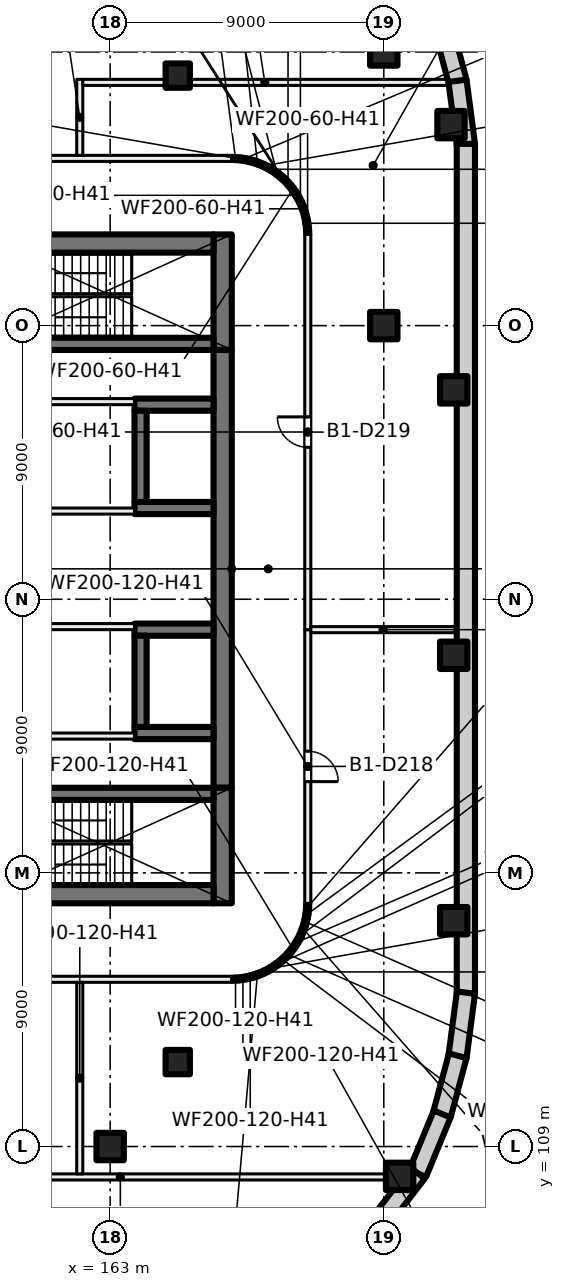
"""IFC4 building model, lengths in metres.
Left out: names, types, materials, properties, quantities, classifications, styles, units other than length and angle.
Written with IfcOpenShell. Run it as: python <this file> out.ifc"""

import sys

from ifc_helpers import new_model, si_unit, direction, frame, frame_2d, origin, origin_2d, place, context, subcontext, project, spatial, rectangle, extrude, element, fill, save


model = new_model("IFC4")
c1 = context("Model", 3, precision=1e-05, world=origin(), true_north=direction((0.0, 1.0)))
c2 = subcontext(c1, "Body", "Model", "MODEL_VIEW")
j1 = project(units=[si_unit("LENGTHUNIT", "METRE"), si_unit("PLANEANGLEUNIT", "RADIAN")], contexts=[c1])
p1 = place(None, origin())
s1 = spatial("IfcSite", under=j1, at=p1, CompositionType="ELEMENT")
p2 = place(p1, origin())
s2 = spatial("IfcBuilding", under=s1, at=p2, CompositionType="ELEMENT")
p3 = place(p2, frame((0.0, 0.0, -4.5)))
s3 = spatial("IfcBuildingStorey", under=s2, at=p3, CompositionType="ELEMENT", Elevation=-4.5)
p4 = place(p3, frame((173.908, 145.968, 0.0), z_axis=(0.0, 0.0, 1.0), x_axis=(0.258804467146, -0.965929732323, 0.0)))
e1 = element("IfcWall", 1, at=p4, inside=s3, PredefinedType="SHEAR", context=c2, shape_type="SweptSolid", body=[
    extrude(rectangle(XDim=2.022, YDim=0.6, at=frame_2d((1.011, 0.0))), origin(), (0.0, 0.0, 1.0), 4.5),
])
p5 = place(p3, frame((174.424, 144.052, 0.0), z_axis=(0.0, 0.0, 1.0), x_axis=(0.130558200013, -0.991440646942, 0.0)))
e2 = element("IfcWall", 2, at=p5, inside=s3, PredefinedType="SHEAR", context=c2, shape_type="SweptSolid", body=[
    extrude(rectangle(XDim=2.132, YDim=0.6, at=frame_2d((1.066, 0.0))), origin(), (0.0, 0.0, 1.0), 4.5),
])
p6 = place(p3, frame((174.7, 141.978, 0.0), z_axis=(0.0, 0.0, 1.0), x_axis=(0.0, -1.0, 0.0)))
e3 = element("IfcWall", 3, at=p6, inside=s3, PredefinedType="SHEAR", context=c2, shape_type="SweptSolid", body=[
    extrude(rectangle(XDim=27.957, YDim=0.6, at=frame_2d((13.978, 0.0))), origin(), (0.0, 0.0, 1.0), 4.5),
])
p7 = place(p3, frame((174.703, 114.061, 0.0), z_axis=(0.0, 0.0, 1.0), x_axis=(-0.130558200013, -0.991440646942, 0.0)))
e4 = element("IfcWall", 4, at=p7, inside=s3, PredefinedType="SHEAR", context=c2, shape_type="SweptSolid", body=[
    extrude(rectangle(XDim=2.132, YDim=0.6, at=frame_2d((1.066, 0.0))), origin(), (0.0, 0.0, 1.0), 4.5),
])
p8 = place(p3, frame((174.432, 111.986, 0.0), z_axis=(0.0, 0.0, 1.0), x_axis=(-0.258804467146, -0.965929732323, 0.0)))
e5 = element("IfcWall", 5, at=p8, inside=s3, PredefinedType="SHEAR", context=c2, shape_type="SweptSolid", body=[
    extrude(rectangle(XDim=2.022, YDim=0.6, at=frame_2d((1.011, 0.0))), origin(), (0.0, 0.0, 1.0), 4.5),
])
p9 = place(p3, frame((173.921, 110.069, 0.0), z_axis=(0.0, 0.0, 1.0), x_axis=(-0.382375593358, -0.924006983526, 0.0)))
e6 = element("IfcWall", 6, at=p9, inside=s3, PredefinedType="SHEAR", context=c2, shape_type="SweptSolid", body=[
    extrude(rectangle(XDim=2.114, YDim=0.6, at=frame_2d((1.057, 0.0))), origin(), (0.0, 0.0, 1.0), 4.5),
])
p10 = place(p3, frame((173.109, 108.128, 0.0), z_axis=(0.0, 0.0, 1.0), x_axis=(-0.609058260448, -0.793125485267, 0.0)))
e7 = element("IfcWall", 7, at=p10, inside=s3, PredefinedType="SHEAR", context=c2, shape_type="SweptSolid", body=[
    extrude(rectangle(XDim=2.044, YDim=0.6, at=frame_2d((1.022, 0.0))), origin(), (0.0, 0.0, 1.0), 4.5),
])
for number, where, z_axis, x_axis in (
    (8, (163.0, 109.0, 0.0), (0.0, 0.0, 1.0), (1.0, 0.0, 0.0)),
    (9, (172.0, 136.0, 0.0), (0.0, 0.0, 1.0), (1.0, 0.0, 0.0)),
    (10, (172.0, 145.0, 0.0), (0.0, 0.0, 1.0), (1.0, 0.0, 0.0)),
    (11, (174.211, 142.611, 0.0), (0.0, 0.0, 1.0), (1.0, 0.0, 0.0)),
    (12, (174.3, 133.887, 0.0), (0.0, 0.0, 1.0), (1.0, 0.0, 0.0)),
    (13, (174.3, 125.157, 0.0), (0.0, 0.0, 1.0), (1.0, 0.0, 0.0)),
    (14, (174.3, 116.427, 0.0), (0.0, 0.0, 1.0), (1.0, 0.0, 0.0)),
    (15, (172.521, 108.019, 0.0), (0.0, 0.0, 1.0), (1.0, 0.0, 0.0)),
):
    element("IfcColumn", number, at=place(p3, frame(where, z_axis=z_axis, x_axis=x_axis)), inside=s3, PredefinedType="COLUMN", context=c2, shape_type="SweptSolid", body=[
        extrude(rectangle(XDim=0.9, YDim=0.9, at=origin_2d()), origin(), (0.0, 0.0, 1.0), 4.5),
    ])
for number, where, z_axis, x_axis in (
    (16, (165.223, 144.223, 0.0), (0.0, 0.0, 1.0), (1.0, 0.0, 0.0)),
    (17, (165.223, 111.777, 0.0), (0.0, 0.0, 1.0), (1.0, 0.0, 0.0)),
):
    element("IfcColumn", number, at=place(p3, frame(where, z_axis=z_axis, x_axis=x_axis)), inside=s3, PredefinedType="COLUMN", context=c2, shape_type="SweptSolid", body=[
        extrude(rectangle(XDim=0.8, YDim=0.8, at=origin_2d()), origin(), (0.0, 0.0, 1.0), 4.5),
    ])
p11 = place(p3, frame((166.7, 139.0, 0.0), z_axis=(0.0, 0.0, 1.0), x_axis=(0.0, -1.0, 0.0)))
e18 = element("IfcWall", 18, at=p11, inside=s3, PredefinedType="SHEAR", context=c2, shape_type="SweptSolid", body=[
    extrude(rectangle(XDim=3.8, YDim=0.6, at=frame_2d((1.9, 0.0))), origin(), (0.0, 0.0, 1.0), 4.5),
])
p12 = place(p3, frame((166.7, 135.2, 0.0), z_axis=(0.0, 0.0, 1.0), x_axis=(0.0, -1.0, 0.0)))
e19 = element("IfcWall", 19, at=p12, inside=s3, PredefinedType="SHEAR", context=c2, shape_type="SweptSolid", body=[
    extrude(rectangle(XDim=14.4, YDim=0.6, at=frame_2d((7.2, 0.0))), origin(), (0.0, 0.0, 1.0), 4.5),
])
p13 = place(p3, frame((166.7, 120.8, 0.0), z_axis=(0.0, 0.0, 1.0), x_axis=(0.0, -1.0, 0.0)))
e20 = element("IfcWall", 20, at=p13, inside=s3, PredefinedType="SHEAR", context=c2, shape_type="SweptSolid", body=[
    extrude(rectangle(XDim=3.8, YDim=0.6, at=frame_2d((1.9, 0.0))), origin(), (0.0, 0.0, 1.0), 4.5),
])
for number, where, z_axis, x_axis in (
    (21, (166.4, 138.7, 0.0), (0.0, 0.0, 1.0), (-1.0, 0.0, 0.0)),
    (22, (166.4, 117.3, 0.0), (0.0, 0.0, 1.0), (-1.0, 0.0, 0.0)),
):
    element("IfcWall", number, at=place(p3, frame(where, z_axis=z_axis, x_axis=x_axis)), inside=s3, PredefinedType="SHEAR", context=c2, shape_type="SweptSolid", body=[
        extrude(rectangle(XDim=7.8, YDim=0.6, at=frame_2d((3.9, 0.0))), origin(), (0.0, 0.0, 1.0), 4.5),
    ])
for number, where, z_axis, x_axis in (
    (23, (166.4, 135.4, 0.0), (0.0, 0.0, 1.0), (-1.0, 0.0, 0.0)),
    (24, (166.4, 120.6, 0.0), (0.0, 0.0, 1.0), (-1.0, 0.0, 0.0)),
):
    element("IfcWall", number, at=place(p3, frame(where, z_axis=z_axis, x_axis=x_axis)), inside=s3, PredefinedType="SHEAR", context=c2, shape_type="SweptSolid", body=[
        extrude(rectangle(XDim=7.8, YDim=0.4, at=frame_2d((3.9, 0.0))), origin(), (0.0, 0.0, 1.0), 4.5),
    ])
for number, where, z_axis, x_axis in (
    (25, (166.4, 130.0, 0.0), (0.0, 0.0, 1.0), (-1.0, 0.0, 0.0)),
    (26, (166.4, 133.4, 0.0), (0.0, 0.0, 1.0), (-1.0, 0.0, 0.0)),
):
    element("IfcWall", number, at=place(p3, frame(where, z_axis=z_axis, x_axis=x_axis)), inside=s3, PredefinedType="SHEAR", context=c2, shape_type="SweptSolid", body=[
        extrude(rectangle(XDim=2.6, YDim=0.4, at=frame_2d((1.3, 0.0))), origin(), (0.0, 0.0, 1.0), 4.5),
    ])
p14 = place(p3, frame((164.0, 133.2, 0.0), z_axis=(0.0, 0.0, 1.0), x_axis=(0.0, -1.0, 0.0)))
e27 = element("IfcWall", 27, at=p14, inside=s3, PredefinedType="SHEAR", context=c2, shape_type="SweptSolid", body=[
    extrude(rectangle(XDim=3.0, YDim=0.4, at=frame_2d((1.5, 0.0))), origin(), (0.0, 0.0, 1.0), 4.5),
])
for number, where, z_axis, x_axis in (
    (28, (166.4, 126.0, 0.0), (0.0, 0.0, 1.0), (-1.0, 0.0, 0.0)),
    (29, (166.4, 122.6, 0.0), (0.0, 0.0, 1.0), (-1.0, 0.0, 0.0)),
):
    element("IfcWall", number, at=place(p3, frame(where, z_axis=z_axis, x_axis=x_axis)), inside=s3, PredefinedType="SHEAR", context=c2, shape_type="SweptSolid", body=[
        extrude(rectangle(XDim=2.6, YDim=0.4, at=frame_2d((1.3, 0.0))), origin(), (0.0, 0.0, 1.0), 4.5),
    ])
p15 = place(p3, frame((164.0, 125.8, 0.0), z_axis=(0.0, 0.0, 1.0), x_axis=(0.0, -1.0, 0.0)))
e30 = element("IfcWall", 30, at=p15, inside=s3, PredefinedType="SHEAR", context=c2, shape_type="SweptSolid", body=[
    extrude(rectangle(XDim=3.0, YDim=0.4, at=frame_2d((1.5, 0.0))), origin(), (0.0, 0.0, 1.0), 4.5),
])
p16 = place(p3, frame((163.8, 126.1, 0.0), z_axis=(0.0, 0.0, 1.0), x_axis=(-1.0, 0.0, 0.0)))
e31 = element("IfcWall", 31, at=p16, inside=s3, PredefinedType="PARTITIONING", context=c2, shape_type="SweptSolid", body=[
    extrude(rectangle(XDim=9.4, YDim=0.2, at=frame_2d((4.7, 0.0))), origin(), (0.0, 0.0, 1.0), 4.1),
])
p17 = place(p16, frame((4.1, 0.0, 0.0)))
e32 = element("IfcOpeningElement", 32, at=p17, cuts=e31, PredefinedType="OPENING", context=c2, shape_type="SweptSolid", body=[
    extrude(rectangle(XDim=1.2, YDim=2.1, at=frame_2d((0.6, 1.05))), frame((0.0, 0.11, 0.0), z_axis=(0.0, -1.0, 0.0), x_axis=(1.0, 0.0, 0.0)), (0.0, 0.0, 1.0), 0.22),
])
p18 = place(p3, frame((163.8, 122.5, 0.0), z_axis=(0.0, 0.0, 1.0), x_axis=(-1.0, 0.0, 0.0)))
e33 = element("IfcWall", 33, at=p18, inside=s3, PredefinedType="PARTITIONING", context=c2, shape_type="SweptSolid", body=[
    extrude(rectangle(XDim=9.4, YDim=0.2, at=frame_2d((4.7, 0.0))), origin(), (0.0, 0.0, 1.0), 4.1),
])
p19 = place(p18, frame((6.55, 0.0, 0.0)))
e34 = element("IfcOpeningElement", 34, at=p19, cuts=e33, PredefinedType="OPENING", context=c2, shape_type="SweptSolid", body=[
    extrude(rectangle(XDim=1.5, YDim=2.1, at=frame_2d((0.75, 1.05))), frame((0.0, 0.11, 0.0), z_axis=(0.0, -1.0, 0.0), x_axis=(1.0, 0.0, 0.0)), (0.0, 0.0, 1.0), 0.22),
])
p20 = place(p3, frame((154.4, 129.9, 0.0), z_axis=(0.0, 0.0, 1.0), x_axis=(1.0, 0.0, 0.0)))
e35 = element("IfcWall", 35, at=p20, inside=s3, PredefinedType="PARTITIONING", context=c2, shape_type="SweptSolid", body=[
    extrude(rectangle(XDim=9.4, YDim=0.2, at=frame_2d((4.7, 0.0))), origin(), (0.0, 0.0, 1.0), 4.1),
])
p21 = place(p20, frame((4.1, 0.0, 0.0)))
e36 = element("IfcOpeningElement", 36, at=p21, cuts=e35, PredefinedType="OPENING", context=c2, shape_type="SweptSolid", body=[
    extrude(rectangle(XDim=1.2, YDim=2.1, at=frame_2d((0.6, 1.05))), frame((0.0, 0.11, 0.0), z_axis=(0.0, -1.0, 0.0), x_axis=(1.0, 0.0, 0.0)), (0.0, 0.0, 1.0), 0.22),
])
p22 = place(p3, frame((154.4, 133.5, 0.0), z_axis=(0.0, 0.0, 1.0), x_axis=(1.0, 0.0, 0.0)))
e37 = element("IfcWall", 37, at=p22, inside=s3, PredefinedType="PARTITIONING", context=c2, shape_type="SweptSolid", body=[
    extrude(rectangle(XDim=9.4, YDim=0.2, at=frame_2d((4.7, 0.0))), origin(), (0.0, 0.0, 1.0), 4.1),
])
p23 = place(p22, frame((1.35, 0.0, 0.0)))
e38 = element("IfcOpeningElement", 38, at=p23, cuts=e37, PredefinedType="OPENING", context=c2, shape_type="SweptSolid", body=[
    extrude(rectangle(XDim=1.5, YDim=2.1, at=frame_2d((0.75, 1.05))), frame((0.0, 0.11, 0.0), z_axis=(0.0, -1.0, 0.0), x_axis=(1.0, 0.0, 0.0)), (0.0, 0.0, 1.0), 0.22),
])
p24 = place(p3, frame((154.1, 108.0, 0.0), z_axis=(0.0, 0.0, 1.0), x_axis=(1.0, 0.0, 0.0)))
e39 = element("IfcWall", 39, at=p24, inside=s3, PredefinedType="PARTITIONING", context=c2, shape_type="SweptSolid", body=[
    extrude(rectangle(XDim=18.469, YDim=0.2, at=frame_2d((9.234, 0.0))), origin(), (0.0, 0.0, 1.0), 4.1),
])
p25 = place(p3, frame((167.002, 114.5, 0.0), z_axis=(0.0, 0.0, 1.0), x_axis=(-1.0, 0.0, 0.0)))
e40 = element("IfcWall", 40, at=p25, inside=s3, PredefinedType="PARTITIONING", context=c2, shape_type="SweptSolid", body=[
    extrude(rectangle(XDim=12.902, YDim=0.2, at=frame_2d((6.451, 0.0))), origin(), (0.0, 0.0, 1.0), 4.1),
])
p26 = place(p25, frame((8.5, 0.0, 0.0)))
e41 = element("IfcOpeningElement", 41, at=p26, cuts=e40, PredefinedType="OPENING", context=c2, shape_type="SweptSolid", body=[
    extrude(rectangle(XDim=1.0, YDim=2.1, at=frame_2d((0.5, 1.05))), frame((0.0, 0.11, 0.0), z_axis=(0.0, -1.0, 0.0), x_axis=(1.0, 0.0, 0.0)), (0.0, 0.0, 1.0), 0.22),
])
p27 = place(p3, frame((154.1, 141.5, 0.0), z_axis=(0.0, 0.0, 1.0), x_axis=(1.0, 0.0, 0.0)))
e42 = element("IfcWall", 42, at=p27, inside=s3, PredefinedType="PARTITIONING", context=c2, shape_type="SweptSolid", body=[
    extrude(rectangle(XDim=12.902, YDim=0.2, at=frame_2d((6.451, 0.0))), origin(), (0.0, 0.0, 1.0), 4.1),
])
p28 = place(p3, frame((162.0, 108.1, 0.0), z_axis=(0.0, 0.0, 1.0), x_axis=(0.0, 1.0, 0.0)))
e43 = element("IfcWall", 43, at=p28, inside=s3, PredefinedType="PARTITIONING", context=c2, shape_type="SweptSolid", body=[
    extrude(rectangle(XDim=6.3, YDim=0.2, at=frame_2d((3.15, 0.0))), origin(), (0.0, 0.0, 1.0), 4.1),
])
p29 = place(p3, frame((162.0, 141.6, 0.0), z_axis=(0.0, 0.0, 1.0), x_axis=(0.0, 1.0, 0.0)))
e44 = element("IfcWall", 44, at=p29, inside=s3, PredefinedType="PARTITIONING", context=c2, shape_type="SweptSolid", body=[
    extrude(rectangle(XDim=2.5, YDim=0.2, at=frame_2d((1.25, 0.0))), origin(), (0.0, 0.0, 1.0), 4.1),
])
p30 = place(p3, frame((162.1, 144.0, 0.0), z_axis=(0.0, 0.0, 1.0), x_axis=(1.0, 0.0, 0.0)))
e45 = element("IfcWall", 45, at=p30, inside=s3, PredefinedType="PARTITIONING", context=c2, shape_type="SweptSolid", body=[
    extrude(rectangle(XDim=11.974, YDim=0.2, at=frame_2d((5.987, 0.0))), origin(), (0.0, 0.0, 1.0), 4.1),
])
for number, where, z_axis, x_axis in (
    (46, (166.998, 114.5, 0.0), (0.0, 0.0, 1.0), (0.999, 0.047, 0.0)),
    (47, (166.998, 141.5, 0.0), (0.0, 0.0, 1.0), (0.999, -0.047, 0.0)),
):
    element("IfcWall", number, at=place(p3, frame(where, z_axis=z_axis, x_axis=x_axis)), inside=s3, PredefinedType="PARTITIONING", context=c2, shape_type="SweptSolid", body=[
        extrude(rectangle(XDim=0.252, YDim=0.2, at=frame_2d((0.126, 0.0))), origin(), (0.0, 0.0, 1.0), 4.1),
    ])
for number, where, z_axis, x_axis in (
    (48, (167.24, 114.511, 0.0), (0.0, 0.0, 1.0), (0.989, 0.149, 0.0)),
    (49, (167.24, 141.489, 0.0), (0.0, 0.0, 1.0), (0.989, -0.149, 0.0)),
):
    element("IfcWall", number, at=place(p3, frame(where, z_axis=z_axis, x_axis=x_axis)), inside=s3, PredefinedType="PARTITIONING", context=c2, shape_type="SweptSolid", body=[
        extrude(rectangle(XDim=0.256, YDim=0.2, at=frame_2d((0.128, 0.0))), origin(), (0.0, 0.0, 1.0), 4.1),
    ])
for number, where, z_axis, x_axis in (
    (50, (167.483, 114.547, 0.0), (0.0, 0.0, 1.0), (0.97, 0.242, 0.0)),
    (51, (167.483, 141.453, 0.0), (0.0, 0.0, 1.0), (0.97, -0.242, 0.0)),
):
    element("IfcWall", number, at=place(p3, frame(where, z_axis=z_axis, x_axis=x_axis)), inside=s3, PredefinedType="PARTITIONING", context=c2, shape_type="SweptSolid", body=[
        extrude(rectangle(XDim=0.256, YDim=0.2, at=frame_2d((0.128, 0.0))), origin(), (0.0, 0.0, 1.0), 4.1),
    ])
for number, where, z_axis, x_axis in (
    (52, (167.722, 114.606, 0.0), (0.0, 0.0, 1.0), (0.941, 0.337, 0.0)),
    (53, (167.722, 141.394, 0.0), (0.0, 0.0, 1.0), (0.941, -0.337, 0.0)),
):
    element("IfcWall", number, at=place(p3, frame(where, z_axis=z_axis, x_axis=x_axis)), inside=s3, PredefinedType="PARTITIONING", context=c2, shape_type="SweptSolid", body=[
        extrude(rectangle(XDim=0.255, YDim=0.2, at=frame_2d((0.127, 0.0))), origin(), (0.0, 0.0, 1.0), 4.1),
    ])
for number, where, z_axis, x_axis in (
    (54, (167.952, 114.688, 0.0), (0.0, 0.0, 1.0), (0.903, 0.429, 0.0)),
    (55, (167.952, 141.312, 0.0), (0.0, 0.0, 1.0), (0.903, -0.429, 0.0)),
):
    element("IfcWall", number, at=place(p3, frame(where, z_axis=z_axis, x_axis=x_axis)), inside=s3, PredefinedType="PARTITIONING", context=c2, shape_type="SweptSolid", body=[
        extrude(rectangle(XDim=0.255, YDim=0.2, at=frame_2d((0.127, 0.0))), origin(), (0.0, 0.0, 1.0), 4.1),
    ])
for number, where, z_axis, x_axis in (
    (56, (168.174, 114.793, 0.0), (0.0, 0.0, 1.0), (0.858, 0.514, 0.0)),
    (57, (168.174, 141.207, 0.0), (0.0, 0.0, 1.0), (0.858, -0.514, 0.0)),
):
    element("IfcWall", number, at=place(p3, frame(where, z_axis=z_axis, x_axis=x_axis)), inside=s3, PredefinedType="PARTITIONING", context=c2, shape_type="SweptSolid", body=[
        extrude(rectangle(XDim=0.255, YDim=0.2, at=frame_2d((0.127, 0.0))), origin(), (0.0, 0.0, 1.0), 4.1),
    ])
for number, where, z_axis, x_axis in (
    (58, (168.385, 114.918, 0.0), (0.0, 0.0, 1.0), (0.803, 0.596, 0.0)),
    (59, (168.385, 141.082, 0.0), (0.0, 0.0, 1.0), (0.803, -0.596, 0.0)),
):
    element("IfcWall", number, at=place(p3, frame(where, z_axis=z_axis, x_axis=x_axis)), inside=s3, PredefinedType="PARTITIONING", context=c2, shape_type="SweptSolid", body=[
        extrude(rectangle(XDim=0.255, YDim=0.2, at=frame_2d((0.128, 0.0))), origin(), (0.0, 0.0, 1.0), 4.1),
    ])
for number, where, z_axis, x_axis in (
    (60, (168.582, 115.064, 0.0), (0.0, 0.0, 1.0), (0.743, 0.669, 0.0)),
    (61, (168.582, 140.936, 0.0), (0.0, 0.0, 1.0), (0.743, -0.669, 0.0)),
    (62, (168.765, 115.228, 0.0), (0.0, 0.0, 1.0), (0.669, 0.743, 0.0)),
    (63, (168.765, 140.772, 0.0), (0.0, 0.0, 1.0), (0.669, -0.743, 0.0)),
):
    element("IfcWall", number, at=place(p3, frame(where, z_axis=z_axis, x_axis=x_axis)), inside=s3, PredefinedType="PARTITIONING", context=c2, shape_type="SweptSolid", body=[
        extrude(rectangle(XDim=0.256, YDim=0.2, at=frame_2d((0.128, 0.0))), origin(), (0.0, 0.0, 1.0), 4.1),
    ])
for number, where, z_axis, x_axis in (
    (64, (168.93, 115.41, 0.0), (0.0, 0.0, 1.0), (0.596, 0.803, 0.0)),
    (65, (168.93, 140.59, 0.0), (0.0, 0.0, 1.0), (0.596, -0.803, 0.0)),
):
    element("IfcWall", number, at=place(p3, frame(where, z_axis=z_axis, x_axis=x_axis)), inside=s3, PredefinedType="PARTITIONING", context=c2, shape_type="SweptSolid", body=[
        extrude(rectangle(XDim=0.255, YDim=0.2, at=frame_2d((0.128, 0.0))), origin(), (0.0, 0.0, 1.0), 4.1),
    ])
for number, where, z_axis, x_axis in (
    (66, (169.076, 115.607, 0.0), (0.0, 0.0, 1.0), (0.514, 0.858, 0.0)),
    (67, (169.076, 140.393, 0.0), (0.0, 0.0, 1.0), (0.514, -0.858, 0.0)),
):
    element("IfcWall", number, at=place(p3, frame(where, z_axis=z_axis, x_axis=x_axis)), inside=s3, PredefinedType="PARTITIONING", context=c2, shape_type="SweptSolid", body=[
        extrude(rectangle(XDim=0.255, YDim=0.2, at=frame_2d((0.127, 0.0))), origin(), (0.0, 0.0, 1.0), 4.1),
    ])
for number, where, z_axis, x_axis in (
    (68, (169.203, 115.818, 0.0), (0.0, 0.0, 1.0), (0.429, 0.903, 0.0)),
    (69, (169.203, 140.182, 0.0), (0.0, 0.0, 1.0), (0.429, -0.903, 0.0)),
):
    element("IfcWall", number, at=place(p3, frame(where, z_axis=z_axis, x_axis=x_axis)), inside=s3, PredefinedType="PARTITIONING", context=c2, shape_type="SweptSolid", body=[
        extrude(rectangle(XDim=0.255, YDim=0.2, at=frame_2d((0.127, 0.0))), origin(), (0.0, 0.0, 1.0), 4.1),
    ])
for number, where, z_axis, x_axis in (
    (70, (169.308, 116.038, 0.0), (0.0, 0.0, 1.0), (0.337, 0.941, 0.0)),
    (71, (169.308, 139.962, 0.0), (0.0, 0.0, 1.0), (0.337, -0.941, 0.0)),
):
    element("IfcWall", number, at=place(p3, frame(where, z_axis=z_axis, x_axis=x_axis)), inside=s3, PredefinedType="PARTITIONING", context=c2, shape_type="SweptSolid", body=[
        extrude(rectangle(XDim=0.255, YDim=0.2, at=frame_2d((0.127, 0.0))), origin(), (0.0, 0.0, 1.0), 4.1),
    ])
for number, where, z_axis, x_axis in (
    (72, (169.391, 116.269, 0.0), (0.0, 0.0, 1.0), (0.242, 0.97, 0.0)),
    (73, (169.391, 139.731, 0.0), (0.0, 0.0, 1.0), (0.242, -0.97, 0.0)),
):
    element("IfcWall", number, at=place(p3, frame(where, z_axis=z_axis, x_axis=x_axis)), inside=s3, PredefinedType="PARTITIONING", context=c2, shape_type="SweptSolid", body=[
        extrude(rectangle(XDim=0.256, YDim=0.2, at=frame_2d((0.128, 0.0))), origin(), (0.0, 0.0, 1.0), 4.1),
    ])
for number, where, z_axis, x_axis in (
    (74, (169.451, 116.507, 0.0), (0.0, 0.0, 1.0), (0.149, 0.989, 0.0)),
    (75, (169.451, 139.493, 0.0), (0.0, 0.0, 1.0), (0.149, -0.989, 0.0)),
):
    element("IfcWall", number, at=place(p3, frame(where, z_axis=z_axis, x_axis=x_axis)), inside=s3, PredefinedType="PARTITIONING", context=c2, shape_type="SweptSolid", body=[
        extrude(rectangle(XDim=0.256, YDim=0.2, at=frame_2d((0.128, 0.0))), origin(), (0.0, 0.0, 1.0), 4.1),
    ])
for number, where, z_axis, x_axis in (
    (76, (169.488, 116.75, 0.0), (0.0, 0.0, 1.0), (0.047, 0.999, 0.0)),
    (77, (169.488, 139.25, 0.0), (0.0, 0.0, 1.0), (0.047, -0.999, 0.0)),
):
    element("IfcWall", number, at=place(p3, frame(where, z_axis=z_axis, x_axis=x_axis)), inside=s3, PredefinedType="PARTITIONING", context=c2, shape_type="SweptSolid", body=[
        extrude(rectangle(XDim=0.252, YDim=0.2, at=frame_2d((0.126, 0.0))), origin(), (0.0, 0.0, 1.0), 4.1),
    ])
p31 = place(p3, frame((169.5, 126.0, 0.0), z_axis=(0.0, 0.0, 1.0), x_axis=(0.0, -1.0, 0.0)))
e78 = element("IfcWall", 78, at=p31, inside=s3, PredefinedType="PARTITIONING", context=c2, shape_type="SweptSolid", body=[
    extrude(rectangle(XDim=9.002, YDim=0.2, at=frame_2d((4.501, 0.0))), origin(), (0.0, 0.0, 1.0), 4.1),
])
p32 = place(p31, frame((3.998, 0.0, 0.0)))
e79 = element("IfcOpeningElement", 79, at=p32, cuts=e78, PredefinedType="OPENING", context=c2, shape_type="SweptSolid", body=[
    extrude(rectangle(XDim=1.0, YDim=2.1, at=frame_2d((0.5, 1.05))), frame((0.0, 0.11, 0.0), z_axis=(0.0, -1.0, 0.0), x_axis=(1.0, 0.0, 0.0)), (0.0, 0.0, 1.0), 0.22),
])
p33 = place(p3, frame((169.5, 139.002, 0.0), z_axis=(0.0, 0.0, 1.0), x_axis=(0.0, -1.0, 0.0)))
e80 = element("IfcWall", 80, at=p33, inside=s3, PredefinedType="PARTITIONING", context=c2, shape_type="SweptSolid", body=[
    extrude(rectangle(XDim=13.002, YDim=0.2, at=frame_2d((6.501, 0.0))), origin(), (0.0, 0.0, 1.0), 4.1),
])
p34 = place(p33, frame((6.004, 0.0, 0.0)))
e81 = element("IfcOpeningElement", 81, at=p34, cuts=e80, PredefinedType="OPENING", context=c2, shape_type="SweptSolid", body=[
    extrude(rectangle(XDim=1.0, YDim=2.1, at=frame_2d((0.5, 1.05))), frame((0.0, 0.11, 0.0), z_axis=(0.0, -1.0, 0.0), x_axis=(1.0, 0.0, 0.0)), (0.0, 0.0, 1.0), 0.22),
])
p35 = place(p3, frame((169.6, 126.0, 0.0), z_axis=(0.0, 0.0, 1.0), x_axis=(1.0, 0.0, 0.0)))
e82 = element("IfcWall", 82, at=p35, inside=s3, PredefinedType="PARTITIONING", context=c2, shape_type="SweptSolid", body=[
    extrude(rectangle(XDim=4.75, YDim=0.2, at=frame_2d((2.375, 0.0))), origin(), (0.0, 0.0, 1.0), 4.1),
])
p36 = place(p32, origin())
e83 = element("IfcDoor", 83, at=p36, inside=s3, OperationType="SINGLE_SWING_RIGHT", PredefinedType="DOOR", context=c2, shape_type="SweptSolid", body=[
    extrude(rectangle(XDim=1.0, YDim=2.1, at=frame_2d((0.5, 1.05))), frame((0.0, 0.025, 0.0), z_axis=(0.0, -1.0, 0.0), x_axis=(1.0, 0.0, 0.0)), (0.0, 0.0, 1.0), 0.05),
])
fill(e79, e83)
p37 = place(p34, origin())
e84 = element("IfcDoor", 84, at=p37, inside=s3, OperationType="SINGLE_SWING_LEFT", PredefinedType="DOOR", context=c2, shape_type="SweptSolid", body=[
    extrude(rectangle(XDim=1.0, YDim=2.1, at=frame_2d((0.5, 1.05))), frame((0.0, 0.025, 0.0), z_axis=(0.0, -1.0, 0.0), x_axis=(1.0, 0.0, 0.0)), (0.0, 0.0, 1.0), 0.05),
])
fill(e81, e84)
save(model, sys.argv[1])
